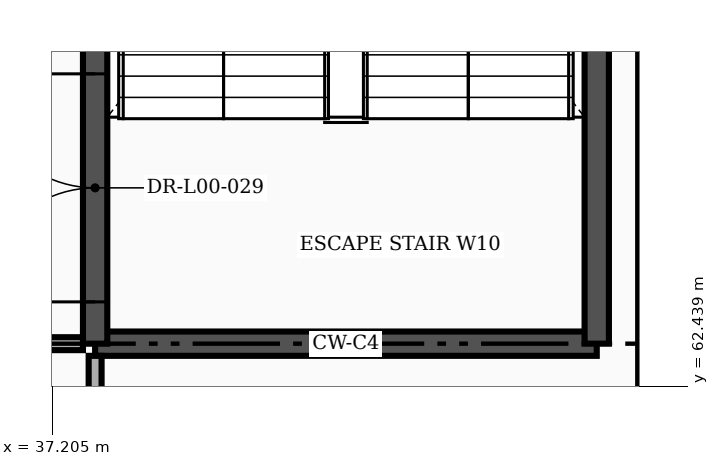
"""IFC4 building model, lengths in metres.
Left out: names, types, materials, properties, quantities, classifications, styles, units other than length and angle.
Written with IfcOpenShell. Run it as: python <this file> out.ifc"""

import sys

from ifc_helpers import new_model, si_unit, direction, frame, frame_2d, origin, place, context, subcontext, project, spatial, rectangle, extrude, element, fill, save


model = new_model("IFC4")
c1 = context("Model", 3, precision=1e-05, world=origin(), true_north=direction((0.0, 1.0)))
c2 = subcontext(c1, "Body", "Model", "MODEL_VIEW")
j1 = project(units=[si_unit("LENGTHUNIT", "METRE"), si_unit("PLANEANGLEUNIT", "RADIAN")], contexts=[c1])
p1 = place(None, origin())
s1 = spatial("IfcSite", under=j1, at=p1, CompositionType="ELEMENT")
p2 = place(p1, origin())
s2 = spatial("IfcBuilding", under=s1, at=p2, CompositionType="ELEMENT")
p3 = place(p2, origin())
s3 = spatial("IfcBuildingStorey", under=s2, at=p3, CompositionType="ELEMENT", Elevation=0.0)
p4 = place(p3, frame((37.77, 63.0, 0.0), z_axis=(0.0, 0.0, 1.0), x_axis=(1.0, 0.0, 0.0)))
e1 = element("IfcWall", 1, at=p4, inside=s3, PredefinedType="SHEAR", context=c2, shape_type="SweptSolid", body=[
    extrude(rectangle(XDim=6.6, YDim=0.32, at=frame_2d((3.3, 0.0))), origin(), (0.0, 0.0, 1.0), 5.75),
])
p5 = place(p3, frame((37.77, 63.0, 0.0), z_axis=(0.0, 0.0, 1.0), x_axis=(0.0, 1.0, 0.0)))
e2 = element("IfcWall", 2, at=p5, inside=s3, PredefinedType="SHEAR", context=c2, shape_type="SweptSolid", body=[
    extrude(rectangle(XDim=11.2, YDim=0.32, at=frame_2d((5.6, 0.0))), origin(), (0.0, 0.0, 1.0), 5.75),
])
p6 = place(p5, frame((0.55, 0.0, 0.0)))
e3 = element("IfcOpeningElement", 3, at=p6, cuts=e2, PredefinedType="OPENING", context=c2, shape_type="SweptSolid", body=[
    extrude(rectangle(XDim=3.0, YDim=2.25, at=frame_2d((1.5, 1.125))), frame((0.0, 0.172, 0.0), z_axis=(0.0, -1.0, 0.0), x_axis=(1.0, 0.0, 0.0)), (0.0, 0.0, 1.0), 0.344),
])
p7 = place(p3, frame((44.37, 63.0, 0.0), z_axis=(0.0, 0.0, 1.0), x_axis=(0.0, 1.0, 0.0)))
e4 = element("IfcWall", 4, at=p7, inside=s3, PredefinedType="SHEAR", context=c2, shape_type="SweptSolid", body=[
    extrude(rectangle(XDim=11.2, YDim=0.32, at=frame_2d((5.6, 0.0))), origin(), (0.0, 0.0, 1.0), 5.75),
])
p8 = place(p3, frame((45.0, 60.22, 0.0), z_axis=(0.0, 0.0, 1.0), x_axis=(0.0, 1.0, 0.0)))
e5 = element("IfcWall", 5, at=p8, inside=s3, PredefinedType="PARTITIONING", context=c2, shape_type="SweptSolid", body=[
    extrude(rectangle(XDim=23.56, YDim=0.17, at=frame_2d((11.78, 0.0))), origin(), (0.0, 0.0, 1.0), 5.066),
])
p9 = place(p3, frame((37.77, 58.5, 0.0), z_axis=(0.0, 0.0, 1.0), x_axis=(0.0, 1.0, 0.0)))
e6 = element("IfcWall", 6, at=p9, inside=s3, PredefinedType="PARTITIONING", context=c2, shape_type="SweptSolid", body=[
    extrude(rectangle(XDim=4.34, YDim=0.17, at=frame_2d((2.17, 0.0))), origin(), (0.0, 0.0, 1.0), 5.75),
])
p10 = place(p3, frame((33.285, 63.0, 0.0), z_axis=(0.0, 0.0, 1.0), x_axis=(1.0, 0.0, 0.0)))
e7 = element("IfcWall", 7, at=p10, inside=s3, PredefinedType="PARTITIONING", context=c2, shape_type="SweptSolid", body=[
    extrude(rectangle(XDim=4.325, YDim=0.17, at=frame_2d((2.163, 0.0))), origin(), (0.0, 0.0, 1.0), 5.75),
])
p11 = place(p6, origin())
e8 = element("IfcDoor", 8, at=p11, inside=s3, OperationType="DOUBLE_DOOR_SINGLE_SWING", PredefinedType="DOOR", context=c2, shape_type="SweptSolid", body=[
    extrude(rectangle(XDim=3.0, YDim=2.25, at=frame_2d((1.5, 1.125))), frame((0.0, 0.025, 0.0), z_axis=(0.0, -1.0, 0.0), x_axis=(1.0, 0.0, 0.0)), (0.0, 0.0, 1.0), 0.05),
])
fill(e3, e8)
save(model, sys.argv[1])
